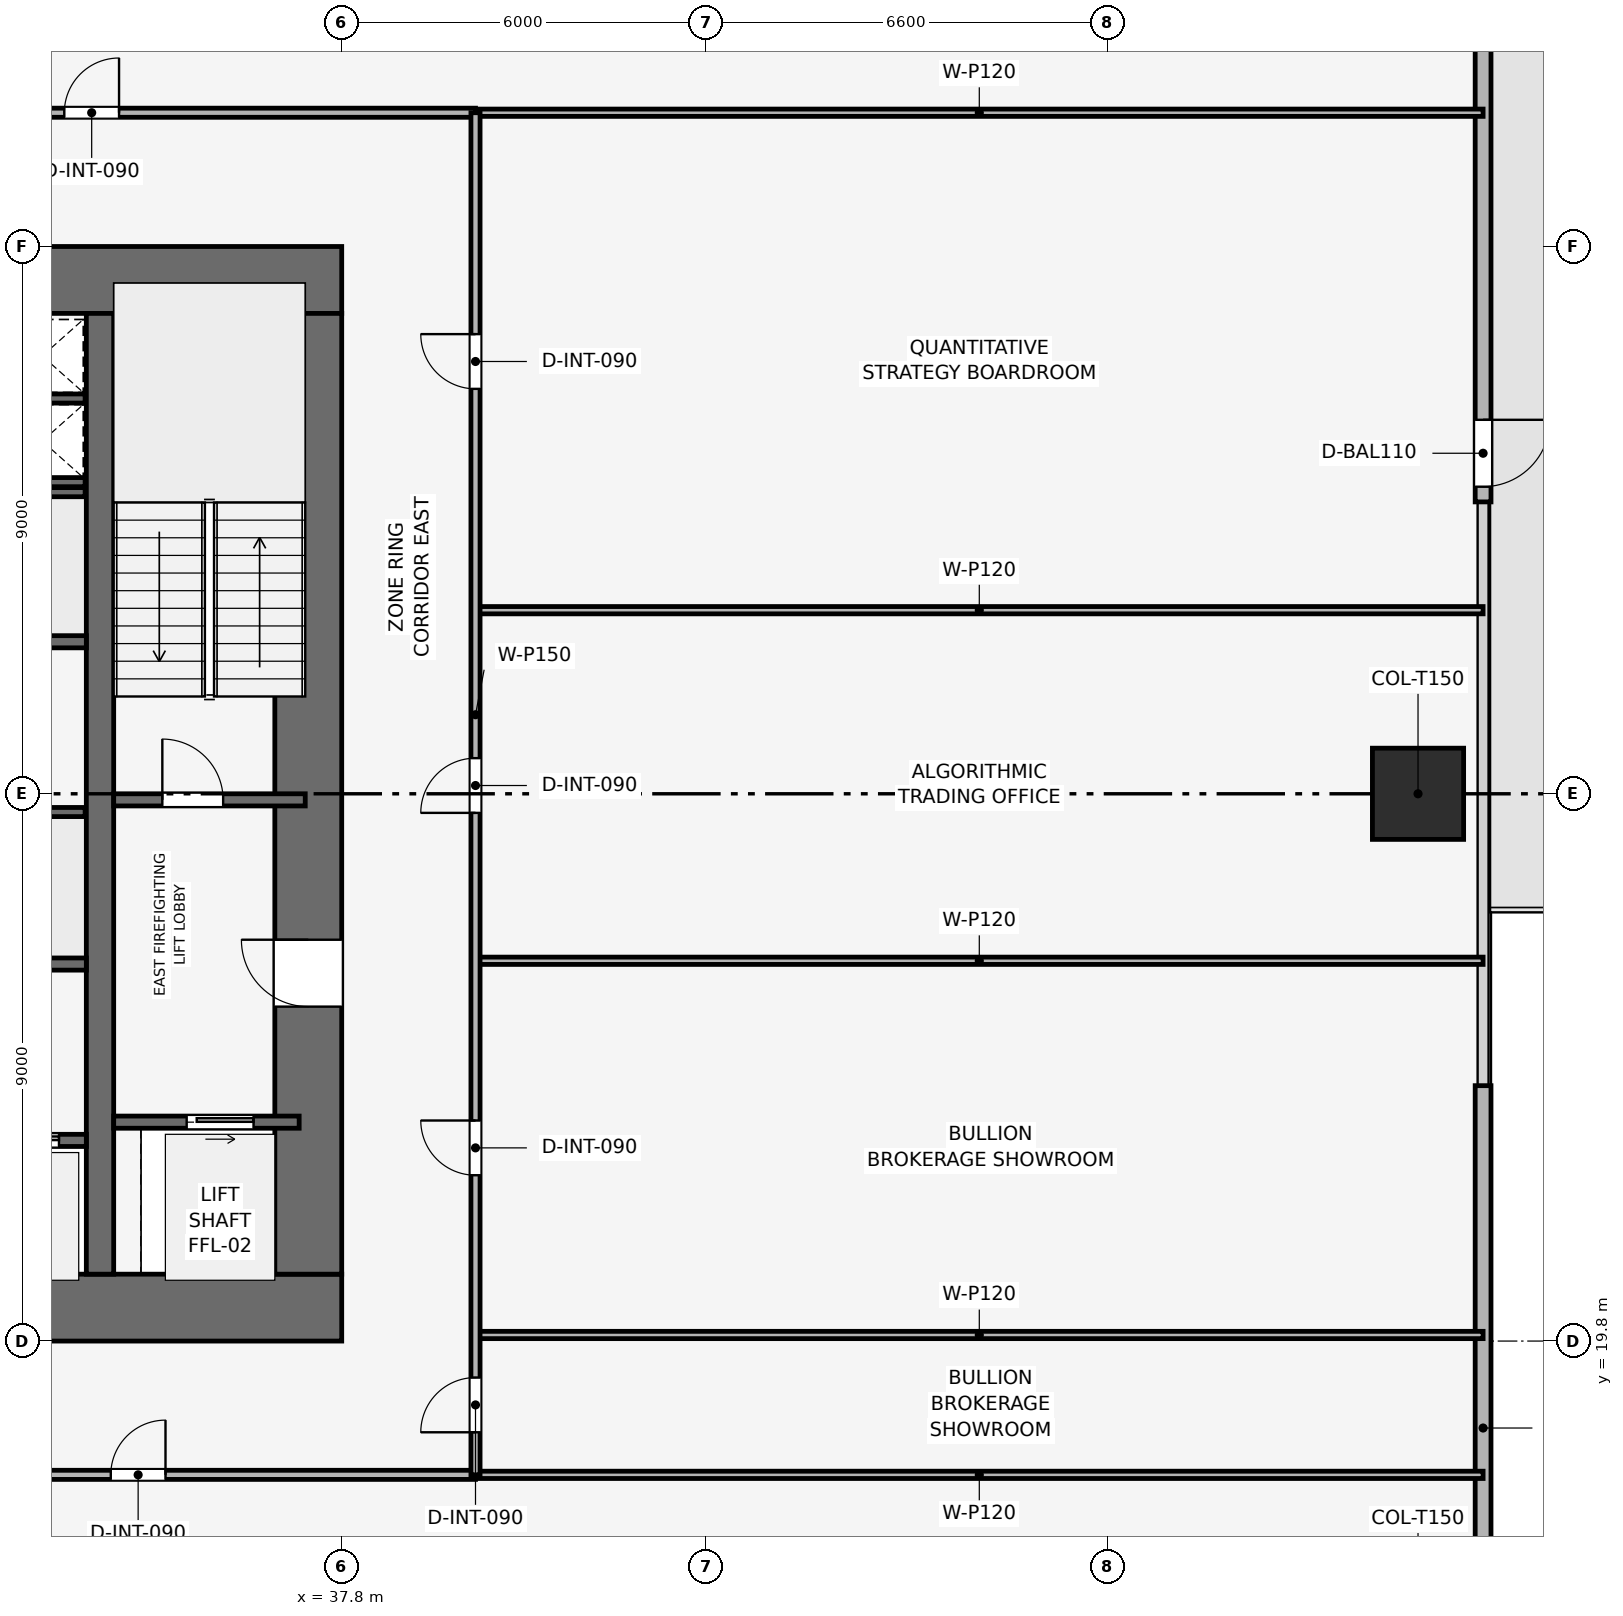
"""IFC4 building model, lengths in metres.
Left out: names, types, materials, properties, quantities, classifications, styles, units other than length and angle.
Written with IfcOpenShell. Run it as: python <this file> out.ifc"""

import sys

from ifc_helpers import new_model, si_unit, direction, frame, frame_2d, origin, origin_2d, place, context, subcontext, project, spatial, rectangle, extrude, element, fill, save


model = new_model("IFC4")
c1 = context("Model", 3, precision=1e-05, world=origin(), true_north=direction((0.0, 1.0)))
c2 = subcontext(c1, "Body", "Model", "MODEL_VIEW")
j1 = project(units=[si_unit("LENGTHUNIT", "METRE"), si_unit("PLANEANGLEUNIT", "RADIAN")], contexts=[c1])
p1 = place(None, origin())
s1 = spatial("IfcSite", under=j1, at=p1, CompositionType="ELEMENT")
p2 = place(p1, origin())
s2 = spatial("IfcBuilding", under=s1, at=p2, CompositionType="ELEMENT")
p3 = place(p2, frame((0.0, 0.0, 49.5)))
s3 = spatial("IfcBuildingStorey", under=s2, at=p3, CompositionType="ELEMENT", Elevation=49.5)
p4 = place(p3, frame((19.8, 20.35, 0.0), z_axis=(0.0, 0.0, 1.0), x_axis=(1.0, 0.0, 0.0)))
e1 = element("IfcWall", 1, at=p4, inside=s3, PredefinedType="SHEAR", context=c2, shape_type="SweptSolid", body=[
    extrude(rectangle(XDim=18.0, YDim=1.1, at=frame_2d((9.0, 0.0))), origin(), (0.0, 0.0, 1.0), 3.9),
])
p5 = place(p4, frame((8.4, 0.0, 0.0)))
e2 = element("IfcOpeningElement", 2, at=p5, cuts=e1, PredefinedType="OPENING", context=c2, shape_type="SweptSolid", body=[
    extrude(rectangle(XDim=1.2, YDim=2.2, at=frame_2d((0.6, 1.1))), frame((0.0, 0.56, 0.0), z_axis=(0.0, -1.0, 0.0), x_axis=(1.0, 0.0, 0.0)), (0.0, 0.0, 1.0), 1.12),
])
p6 = place(p3, frame((19.8, 37.25, 0.0), z_axis=(0.0, 0.0, 1.0), x_axis=(1.0, 0.0, 0.0)))
e3 = element("IfcWall", 3, at=p6, inside=s3, PredefinedType="SHEAR", context=c2, shape_type="SweptSolid", body=[
    extrude(rectangle(XDim=18.0, YDim=1.1, at=frame_2d((9.0, 0.0))), origin(), (0.0, 0.0, 1.0), 3.9),
])
p7 = place(p6, frame((7.05, 0.0, 0.0)))
e4 = element("IfcOpeningElement", 4, at=p7, cuts=e3, PredefinedType="OPENING", context=c2, shape_type="SweptSolid", body=[
    extrude(rectangle(XDim=1.1, YDim=2.15, at=frame_2d((0.55, 1.075))), frame((0.0, 0.56, 0.0), z_axis=(0.0, -1.0, 0.0), x_axis=(1.0, 0.0, 0.0)), (0.0, 0.0, 1.0), 1.12),
])
p8 = place(p3, frame((37.25, 20.9, 0.0), z_axis=(0.0, 0.0, 1.0), x_axis=(0.0, 1.0, 0.0)))
e5 = element("IfcWall", 5, at=p8, inside=s3, PredefinedType="SHEAR", context=c2, shape_type="SweptSolid", body=[
    extrude(rectangle(XDim=15.8, YDim=1.1, at=frame_2d((7.9, 0.0))), origin(), (0.0, 0.0, 1.0), 3.9),
])
p9 = place(p8, frame((4.4, 0.0, 0.0)))
e6 = element("IfcOpeningElement", 6, at=p9, cuts=e5, PredefinedType="OPENING", context=c2, shape_type="SweptSolid", body=[
    extrude(rectangle(XDim=1.1, YDim=2.15, at=frame_2d((0.55, 1.075))), frame((0.0, 0.56, 0.0), z_axis=(0.0, -1.0, 0.0), x_axis=(1.0, 0.0, 0.0)), (0.0, 0.0, 1.0), 1.12),
])
p10 = place(p3, frame((33.825, 20.9, 0.0), z_axis=(0.0, 0.0, 1.0), x_axis=(0.0, 1.0, 0.0)))
e7 = element("IfcWall", 7, at=p10, inside=s3, PredefinedType="SHEAR", context=c2, shape_type="SweptSolid", body=[
    extrude(rectangle(XDim=15.8, YDim=0.45, at=frame_2d((7.9, 0.0))), origin(), (0.0, 0.0, 1.0), 3.9),
])
p11 = place(p3, frame((55.5, 28.8, 0.003), z_axis=(0.0, 0.0, 1.0), x_axis=(1.0, 0.0, 0.0)))
e8 = element("IfcColumn", 8, at=p11, inside=s3, PredefinedType="COLUMN", context=c2, shape_type="SweptSolid", body=[
    extrude(rectangle(XDim=1.5, YDim=1.5, at=origin_2d()), origin(), (0.0, 0.0, 1.0), 3.644),
])
p12 = place(p3, frame((56.57, 48.9, 0.0), z_axis=(0.0, 0.0, 1.0), x_axis=(0.0, -1.0, 0.0)))
e9 = element("IfcWall", 9, at=p12, inside=s3, PredefinedType="SOLIDWALL", context=c2, shape_type="SweptSolid", body=[
    extrude(rectangle(XDim=15.3, YDim=0.26, at=frame_2d((7.65, 0.0))), origin(), (0.0, 0.0, 1.0), 3.65),
])
p13 = place(p12, frame((13.95, 0.0, 0.0)))
e10 = element("IfcOpeningElement", 10, at=p13, cuts=e9, PredefinedType="OPENING", context=c2, shape_type="SweptSolid", body=[
    extrude(rectangle(XDim=1.1, YDim=2.2, at=frame_2d((0.55, 1.1))), frame((0.0, 0.14, 0.0), z_axis=(0.0, -1.0, 0.0), x_axis=(1.0, 0.0, 0.0)), (0.0, 0.0, 1.0), 0.28),
])
p14 = place(p3, frame((56.57, 24.0, 0.0), z_axis=(0.0, 0.0, 1.0), x_axis=(0.0, -1.0, 0.0)))
e11 = element("IfcWall", 11, at=p14, inside=s3, PredefinedType="SOLIDWALL", context=c2, shape_type="SweptSolid", body=[
    extrude(rectangle(XDim=15.3, YDim=0.26, at=frame_2d((7.65, 0.0))), origin(), (0.0, 0.0, 1.0), 3.65),
])
p15 = place(p14, frame((11.25, 0.0, 0.9)))
e12 = element("IfcOpeningElement", 12, at=p15, cuts=e11, PredefinedType="OPENING", context=c2, shape_type="SweptSolid", body=[
    extrude(rectangle(XDim=3.8, YDim=1.9, at=frame_2d((1.9, 0.95))), frame((0.0, 0.14, 0.0), z_axis=(0.0, -1.0, 0.0), x_axis=(1.0, 0.0, 0.0)), (0.0, 0.0, 1.0), 0.28),
])
p16 = place(p3, frame((34.05, 28.7, 0.0), z_axis=(0.0, 0.0, 1.0), x_axis=(1.0, 0.0, 0.0)))
e13 = element("IfcWall", 13, at=p16, inside=s3, PredefinedType="SHEAR", context=c2, shape_type="SweptSolid", body=[
    extrude(rectangle(XDim=3.15, YDim=0.2, at=frame_2d((1.575, 0.0))), origin(), (0.0, 0.0, 1.0), 3.65),
])
p17 = place(p16, frame((0.8, 0.0, 0.0)))
e14 = element("IfcOpeningElement", 14, at=p17, cuts=e13, PredefinedType="OPENING", context=c2, shape_type="SweptSolid", body=[
    extrude(rectangle(XDim=1.0, YDim=2.1, at=frame_2d((0.5, 1.05))), frame((0.0, 0.11, 0.0), z_axis=(0.0, -1.0, 0.0), x_axis=(1.0, 0.0, 0.0)), (0.0, 0.0, 1.0), 0.22),
])
for number, where, z_axis, x_axis in (
    (15, (32.25, 33.925, 0.0), (0.0, 0.0, 1.0), (1.0, 0.0, 0.0)),
    (16, (32.25, 35.3, 0.0), (0.0, 0.0, 1.0), (1.0, 0.0, 0.0)),
):
    element("IfcWall", number, at=place(p3, frame(where, z_axis=z_axis, x_axis=x_axis)), inside=s3, PredefinedType="SHEAR", context=c2, shape_type="SweptSolid", body=[
        extrude(rectangle(XDim=1.33, YDim=0.15, at=frame_2d((0.665, 0.0))), origin(), (0.0, 0.0, 1.0), 3.65),
    ])
p18 = place(p3, frame((34.05, 23.4, 0.0), z_axis=(0.0, 0.0, 1.0), x_axis=(1.0, 0.0, 0.0)))
e17 = element("IfcWall", 17, at=p18, inside=s3, PredefinedType="SHEAR", context=c2, shape_type="SweptSolid", body=[
    extrude(rectangle(XDim=3.05, YDim=0.2, at=frame_2d((1.525, 0.0))), origin(), (0.0, 0.0, 1.0), 3.65),
])
p19 = place(p18, frame((1.2, 0.0, 0.0)))
e18 = element("IfcOpeningElement", 18, at=p19, cuts=e17, PredefinedType="OPENING", context=c2, shape_type="SweptSolid", body=[
    extrude(rectangle(XDim=1.1, YDim=2.15, at=frame_2d((0.55, 1.075))), frame((0.0, 0.11, 0.0), z_axis=(0.0, -1.0, 0.0), x_axis=(1.0, 0.0, 0.0)), (0.0, 0.0, 1.0), 0.22),
])
p20 = place(p3, frame((31.6, 23.1, 0.0), z_axis=(0.0, 0.0, 1.0), x_axis=(1.0, 0.0, 0.0)))
e19 = element("IfcWall", 19, at=p20, inside=s3, PredefinedType="SHEAR", context=c2, shape_type="SweptSolid", body=[
    extrude(rectangle(XDim=2.0, YDim=0.2, at=frame_2d((1.0, 0.0))), origin(), (0.0, 0.0, 1.0), 3.65),
])
p21 = place(p20, frame((0.45, 0.0, 0.0)))
e20 = element("IfcOpeningElement", 20, at=p21, cuts=e19, PredefinedType="OPENING", context=c2, shape_type="SweptSolid", body=[
    extrude(rectangle(XDim=1.1, YDim=2.15, at=frame_2d((0.55, 1.075))), frame((0.0, 0.11, 0.0), z_axis=(0.0, -1.0, 0.0), x_axis=(1.0, 0.0, 0.0)), (0.0, 0.0, 1.0), 0.22),
])
for number, where, z_axis, x_axis in (
    (21, (31.6, 26.0, 0.0), (0.0, 0.0, 1.0), (1.0, 0.0, 0.0)),
    (22, (31.6, 31.3, 0.0), (0.0, 0.0, 1.0), (1.0, 0.0, 0.0)),
):
    element("IfcWall", number, at=place(p3, frame(where, z_axis=z_axis, x_axis=x_axis)), inside=s3, PredefinedType="SHEAR", context=c2, shape_type="SweptSolid", body=[
        extrude(rectangle(XDim=2.0, YDim=0.2, at=frame_2d((1.0, 0.0))), origin(), (0.0, 0.0, 1.0), 3.65),
    ])
for number, where, z_axis, x_axis in (
    (23, (29.5, 28.5, 0.0), (0.0, 0.0, 1.0), (1.0, 0.0, 0.0)),
    (24, (29.5, 33.76, 0.0), (0.0, 0.0, 1.0), (1.0, 0.0, 0.0)),
):
    element("IfcWall", number, at=place(p3, frame(where, z_axis=z_axis, x_axis=x_axis)), inside=s3, PredefinedType="SHEAR", context=c2, shape_type="SweptSolid", body=[
        extrude(rectangle(XDim=4.08, YDim=0.15, at=frame_2d((2.04, 0.0))), origin(), (0.0, 0.0, 1.0), 3.65),
    ])
for number, where, z_axis, x_axis in (
    (25, (40.0, 17.6, 0.0), (0.0, 0.0, 1.0), (1.0, 0.0, 0.0)),
    (26, (40.0, 40.0, 0.0), (0.0, 0.0, 1.0), (1.0, 0.0, 0.0)),
    (27, (40.0, 19.9, 0.0), (0.0, 0.0, 1.0), (1.0, 0.0, 0.0)),
    (28, (40.0, 26.054, 0.0), (0.0, 0.0, 1.0), (1.0, 0.0, 0.0)),
    (29, (40.0, 31.819, 0.0), (0.0, 0.0, 1.0), (1.0, 0.0, 0.0)),
):
    element("IfcWall", number, at=place(p3, frame(where, z_axis=z_axis, x_axis=x_axis)), inside=s3, PredefinedType="PARTITIONING", context=c2, shape_type="SweptSolid", body=[
        extrude(rectangle(XDim=16.57, YDim=0.12, at=frame_2d((8.285, 0.0))), origin(), (0.0, 0.0, 1.0), 2.935),
    ])
p22 = place(p3, frame((17.6, 17.6, 0.0), z_axis=(0.0, 0.0, 1.0), x_axis=(1.0, 0.0, 0.0)))
e30 = element("IfcWall", 30, at=p22, inside=s3, PredefinedType="PARTITIONING", context=c2, shape_type="SweptSolid", body=[
    extrude(rectangle(XDim=22.4, YDim=0.15, at=frame_2d((11.2, 0.0))), origin(), (0.0, 0.0, 1.0), 3.085),
])
p23 = place(p22, frame((0.7, 0.0, 0.0)))
e31 = element("IfcOpeningElement", 31, at=p23, cuts=e30, PredefinedType="OPENING", context=c2, shape_type="SweptSolid", body=[
    extrude(rectangle(XDim=0.9, YDim=2.1, at=frame_2d((0.45, 1.05))), frame((0.0, 0.085, 0.0), z_axis=(0.0, -1.0, 0.0), x_axis=(1.0, 0.0, 0.0)), (0.0, 0.0, 1.0), 0.17),
])
p24 = place(p22, frame((6.352, 0.0, 0.0)))
e32 = element("IfcOpeningElement", 32, at=p24, cuts=e30, PredefinedType="OPENING", context=c2, shape_type="SweptSolid", body=[
    extrude(rectangle(XDim=0.9, YDim=2.1, at=frame_2d((0.45, 1.05))), frame((0.0, 0.085, 0.0), z_axis=(0.0, -1.0, 0.0), x_axis=(1.0, 0.0, 0.0)), (0.0, 0.0, 1.0), 0.17),
])
p25 = place(p22, frame((16.402, 0.0, 0.0)))
e33 = element("IfcOpeningElement", 33, at=p25, cuts=e30, PredefinedType="OPENING", context=c2, shape_type="SweptSolid", body=[
    extrude(rectangle(XDim=0.9, YDim=2.1, at=frame_2d((0.45, 1.05))), frame((0.0, 0.085, 0.0), z_axis=(0.0, -1.0, 0.0), x_axis=(1.0, 0.0, 0.0)), (0.0, 0.0, 1.0), 0.17),
])
p26 = place(p3, frame((17.6, 40.0, 0.0), z_axis=(0.0, 0.0, 1.0), x_axis=(1.0, 0.0, 0.0)))
e34 = element("IfcWall", 34, at=p26, inside=s3, PredefinedType="PARTITIONING", context=c2, shape_type="SweptSolid", body=[
    extrude(rectangle(XDim=22.4, YDim=0.15, at=frame_2d((11.2, 0.0))), origin(), (0.0, 0.0, 1.0), 3.085),
])
p27 = place(p26, frame((4.438, 0.0, 0.0)))
e35 = element("IfcOpeningElement", 35, at=p27, cuts=e34, PredefinedType="OPENING", context=c2, shape_type="SweptSolid", body=[
    extrude(rectangle(XDim=0.9, YDim=2.1, at=frame_2d((0.45, 1.05))), frame((0.0, 0.085, 0.0), z_axis=(0.0, -1.0, 0.0), x_axis=(1.0, 0.0, 0.0)), (0.0, 0.0, 1.0), 0.17),
])
p28 = place(p26, frame((15.638, 0.0, 0.0)))
e36 = element("IfcOpeningElement", 36, at=p28, cuts=e34, PredefinedType="OPENING", context=c2, shape_type="SweptSolid", body=[
    extrude(rectangle(XDim=0.9, YDim=2.1, at=frame_2d((0.45, 1.05))), frame((0.0, 0.085, 0.0), z_axis=(0.0, -1.0, 0.0), x_axis=(1.0, 0.0, 0.0)), (0.0, 0.0, 1.0), 0.17),
])
p29 = place(p3, frame((40.0, 17.6, 0.0), z_axis=(0.0, 0.0, 1.0), x_axis=(0.0, 1.0, 0.0)))
e37 = element("IfcWall", 37, at=p29, inside=s3, PredefinedType="PARTITIONING", context=c2, shape_type="SweptSolid", body=[
    extrude(rectangle(XDim=22.4, YDim=0.15, at=frame_2d((11.2, 0.0))), origin(), (0.0, 0.0, 1.0), 3.085),
])
p30 = place(p29, frame((0.7, 0.0, 0.0)))
e38 = element("IfcOpeningElement", 38, at=p30, cuts=e37, PredefinedType="OPENING", context=c2, shape_type="SweptSolid", body=[
    extrude(rectangle(XDim=0.9, YDim=2.1, at=frame_2d((0.45, 1.05))), frame((0.0, 0.085, 0.0), z_axis=(0.0, -1.0, 0.0), x_axis=(1.0, 0.0, 0.0)), (0.0, 0.0, 1.0), 0.17),
])
p31 = place(p29, frame((4.927, 0.0, 0.0)))
e39 = element("IfcOpeningElement", 39, at=p31, cuts=e37, PredefinedType="OPENING", context=c2, shape_type="SweptSolid", body=[
    extrude(rectangle(XDim=0.9, YDim=2.1, at=frame_2d((0.45, 1.05))), frame((0.0, 0.085, 0.0), z_axis=(0.0, -1.0, 0.0), x_axis=(1.0, 0.0, 0.0)), (0.0, 0.0, 1.0), 0.17),
])
p32 = place(p29, frame((10.886, 0.0, 0.0)))
e40 = element("IfcOpeningElement", 40, at=p32, cuts=e37, PredefinedType="OPENING", context=c2, shape_type="SweptSolid", body=[
    extrude(rectangle(XDim=0.9, YDim=2.1, at=frame_2d((0.45, 1.05))), frame((0.0, 0.085, 0.0), z_axis=(0.0, -1.0, 0.0), x_axis=(1.0, 0.0, 0.0)), (0.0, 0.0, 1.0), 0.17),
])
p33 = place(p29, frame((17.859, 0.0, 0.0)))
e41 = element("IfcOpeningElement", 41, at=p33, cuts=e37, PredefinedType="OPENING", context=c2, shape_type="SweptSolid", body=[
    extrude(rectangle(XDim=0.9, YDim=2.1, at=frame_2d((0.45, 1.05))), frame((0.0, 0.085, 0.0), z_axis=(0.0, -1.0, 0.0), x_axis=(1.0, 0.0, 0.0)), (0.0, 0.0, 1.0), 0.17),
])
p34 = place(p13, origin())
e42 = element("IfcDoor", 42, at=p34, inside=s3, OperationType="SINGLE_SWING_LEFT", PredefinedType="DOOR", context=c2, shape_type="SweptSolid", body=[
    extrude(rectangle(XDim=1.1, YDim=2.2, at=frame_2d((0.55, 1.1))), frame((0.0, 0.025, 0.0), z_axis=(0.0, -1.0, 0.0), x_axis=(1.0, 0.0, 0.0)), (0.0, 0.0, 1.0), 0.05),
])
fill(e10, e42)
p35 = place(p17, origin())
e43 = element("IfcDoor", 43, at=p35, inside=s3, OperationType="SINGLE_SWING_LEFT", PredefinedType="DOOR", context=c2, shape_type="SweptSolid", body=[
    extrude(rectangle(XDim=1.0, YDim=2.1, at=frame_2d((0.5, 1.05))), frame((0.0, 0.025, 0.0), z_axis=(0.0, -1.0, 0.0), x_axis=(1.0, 0.0, 0.0)), (0.0, 0.0, 1.0), 0.05),
])
fill(e14, e43)
p36 = place(p19, origin())
e44 = element("IfcDoor", 44, at=p36, inside=s3, OperationType="SLIDING_TO_RIGHT", PredefinedType="DOOR", context=c2, shape_type="SweptSolid", body=[
    extrude(rectangle(XDim=1.1, YDim=2.15, at=frame_2d((0.55, 1.075))), frame((0.0, 0.025, 0.0), z_axis=(0.0, -1.0, 0.0), x_axis=(1.0, 0.0, 0.0)), (0.0, 0.0, 1.0), 0.05),
])
fill(e18, e44)
p37 = place(p21, origin())
e45 = element("IfcDoor", 45, at=p37, inside=s3, OperationType="SLIDING_TO_RIGHT", PredefinedType="DOOR", context=c2, shape_type="SweptSolid", body=[
    extrude(rectangle(XDim=1.1, YDim=2.15, at=frame_2d((0.55, 1.075))), frame((0.0, 0.025, 0.0), z_axis=(0.0, -1.0, 0.0), x_axis=(1.0, 0.0, 0.0)), (0.0, 0.0, 1.0), 0.05),
])
fill(e20, e45)
p38 = place(p25, origin())
e46 = element("IfcDoor", 46, at=p38, inside=s3, OperationType="SINGLE_SWING_RIGHT", PredefinedType="DOOR", context=c2, shape_type="SweptSolid", body=[
    extrude(rectangle(XDim=0.9, YDim=2.1, at=frame_2d((0.45, 1.05))), frame((0.0, 0.025, 0.0), z_axis=(0.0, -1.0, 0.0), x_axis=(1.0, 0.0, 0.0)), (0.0, 0.0, 1.0), 0.05),
])
fill(e33, e46)
p39 = place(p28, origin())
e47 = element("IfcDoor", 47, at=p39, inside=s3, OperationType="SINGLE_SWING_RIGHT", PredefinedType="DOOR", context=c2, shape_type="SweptSolid", body=[
    extrude(rectangle(XDim=0.9, YDim=2.1, at=frame_2d((0.45, 1.05))), frame((0.0, 0.025, 0.0), z_axis=(0.0, -1.0, 0.0), x_axis=(1.0, 0.0, 0.0)), (0.0, 0.0, 1.0), 0.05),
])
fill(e36, e47)
p40 = place(p30, origin())
e48 = element("IfcDoor", 48, at=p40, inside=s3, OperationType="SINGLE_SWING_LEFT", PredefinedType="DOOR", context=c2, shape_type="SweptSolid", body=[
    extrude(rectangle(XDim=0.9, YDim=2.1, at=frame_2d((0.45, 1.05))), frame((0.0, 0.025, 0.0), z_axis=(0.0, -1.0, 0.0), x_axis=(1.0, 0.0, 0.0)), (0.0, 0.0, 1.0), 0.05),
])
fill(e38, e48)
p41 = place(p31, origin())
e49 = element("IfcDoor", 49, at=p41, inside=s3, OperationType="SINGLE_SWING_RIGHT", PredefinedType="DOOR", context=c2, shape_type="SweptSolid", body=[
    extrude(rectangle(XDim=0.9, YDim=2.1, at=frame_2d((0.45, 1.05))), frame((0.0, 0.025, 0.0), z_axis=(0.0, -1.0, 0.0), x_axis=(1.0, 0.0, 0.0)), (0.0, 0.0, 1.0), 0.05),
])
fill(e39, e49)
p42 = place(p32, origin())
e50 = element("IfcDoor", 50, at=p42, inside=s3, OperationType="SINGLE_SWING_LEFT", PredefinedType="DOOR", context=c2, shape_type="SweptSolid", body=[
    extrude(rectangle(XDim=0.9, YDim=2.1, at=frame_2d((0.45, 1.05))), frame((0.0, 0.025, 0.0), z_axis=(0.0, -1.0, 0.0), x_axis=(1.0, 0.0, 0.0)), (0.0, 0.0, 1.0), 0.05),
])
fill(e40, e50)
p43 = place(p33, origin())
e51 = element("IfcDoor", 51, at=p43, inside=s3, OperationType="SINGLE_SWING_RIGHT", PredefinedType="DOOR", context=c2, shape_type="SweptSolid", body=[
    extrude(rectangle(XDim=0.9, YDim=2.1, at=frame_2d((0.45, 1.05))), frame((0.0, 0.025, 0.0), z_axis=(0.0, -1.0, 0.0), x_axis=(1.0, 0.0, 0.0)), (0.0, 0.0, 1.0), 0.05),
])
fill(e41, e51)
p44 = place(p9, origin())
e52 = element("IfcDoor", 52, at=p44, inside=s3, OperationType="SINGLE_SWING_RIGHT", PredefinedType="DOOR", context=c2, shape_type="SweptSolid", body=[
    extrude(rectangle(XDim=1.1, YDim=2.15, at=frame_2d((0.55, 1.075))), frame((0.0, 0.025, 0.0), z_axis=(0.0, -1.0, 0.0), x_axis=(1.0, 0.0, 0.0)), (0.0, 0.0, 1.0), 0.05),
])
fill(e6, e52)
save(model, sys.argv[1])
